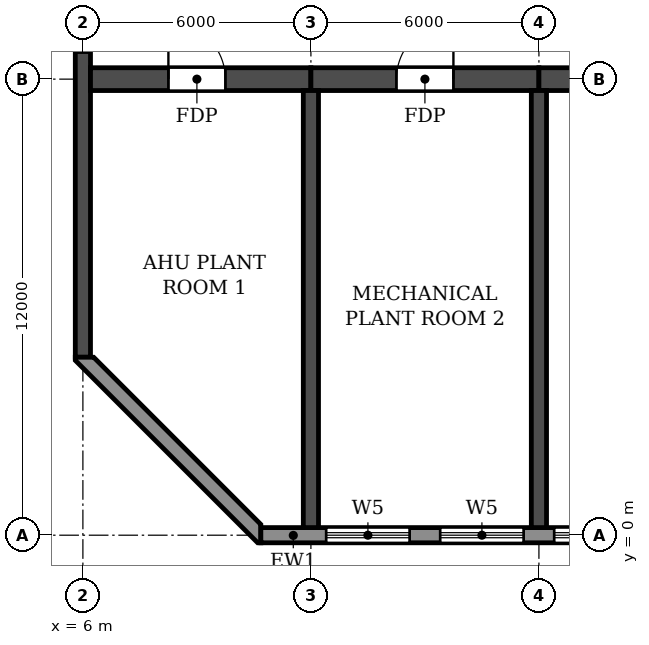
"""IFC4 building model, lengths in metres.
Left out: names, types, materials, properties, quantities, classifications, styles, units other than length and angle.
Written with IfcOpenShell. Run it as: python <this file> out.ifc"""

import sys

from ifc_helpers import new_model, si_unit, direction, frame, frame_2d, origin, place, context, subcontext, project, spatial, polyline, rectangle, outline, extrude, element, fill, save


model = new_model("IFC4")
c1 = context("Model", 3, precision=1e-05, world=origin(), true_north=direction((0.0, 1.0)))
c2 = subcontext(c1, "Body", "Model", "MODEL_VIEW")
j1 = project(units=[si_unit("LENGTHUNIT", "METRE"), si_unit("PLANEANGLEUNIT", "RADIAN")], contexts=[c1])
p1 = place(None, origin())
s1 = spatial("IfcSite", under=j1, at=p1, CompositionType="ELEMENT")
p2 = place(p1, origin())
s2 = spatial("IfcBuilding", under=s1, at=p2, CompositionType="ELEMENT")
p3 = place(p2, frame((0.0, 0.0, 66.3)))
s3 = spatial("IfcBuildingStorey", under=s2, at=p3, CompositionType="ELEMENT", Elevation=66.3)
for number, where, z_axis, x_axis in (
    (1, (12.0, 0.2, 0.0), (0.0, 0.0, 1.0), (0.0, 1.0, 0.0)),
    (2, (18.0, 0.2, 0.0), (0.0, 0.0, 1.0), (0.0, 1.0, 0.0)),
):
    element("IfcWall", number, at=place(p3, frame(where, z_axis=z_axis, x_axis=x_axis)), inside=s3, PredefinedType="SHEAR", context=c2, shape_type="SweptSolid", body=[
        extrude(rectangle(XDim=11.5, YDim=0.4, at=frame_2d((5.75, 0.0))), origin(), (0.0, 0.0, 1.0), 6.36),
    ])
p4 = place(p3, frame((6.0, 4.683, 0.0), z_axis=(0.0, 0.0, 1.0), x_axis=(0.0, 1.0, 0.0)))
e3 = element("IfcWall", 3, at=p4, inside=s3, PredefinedType="SHEAR", context=c2, shape_type="SweptSolid", body=[
    extrude(rectangle(XDim=35.434, YDim=0.4, at=frame_2d((17.717, 0.0))), origin(), (0.0, 0.0, 1.0), 6.36),
])
p5 = place(p4, frame((23.817, 0.0, 0.9)))
e4 = element("IfcOpeningElement", 4, at=p5, cuts=e3, PredefinedType="OPENING", context=c2, shape_type="SweptSolid", body=[
    extrude(rectangle(XDim=1.2, YDim=1.5, at=frame_2d((0.6, 0.75))), frame((0.0, 0.21, 0.0), z_axis=(0.0, -1.0, 0.0), x_axis=(1.0, 0.0, 0.0)), (0.0, 0.0, 1.0), 0.42),
])
p6 = place(p4, frame((8.017, 0.0, 0.9)))
e5 = element("IfcOpeningElement", 5, at=p6, cuts=e3, PredefinedType="OPENING", context=c2, shape_type="SweptSolid", body=[
    extrude(rectangle(XDim=1.2, YDim=1.5, at=frame_2d((0.6, 0.75))), frame((0.0, 0.21, 0.0), z_axis=(0.0, -1.0, 0.0), x_axis=(1.0, 0.0, 0.0)), (0.0, 0.0, 1.0), 0.42),
])
p7 = place(p4, frame((13.317, 0.0, 0.9)))
e6 = element("IfcOpeningElement", 6, at=p7, cuts=e3, PredefinedType="OPENING", context=c2, shape_type="SweptSolid", body=[
    extrude(rectangle(XDim=1.2, YDim=1.5, at=frame_2d((0.6, 0.75))), frame((0.0, 0.21, 0.0), z_axis=(0.0, -1.0, 0.0), x_axis=(1.0, 0.0, 0.0)), (0.0, 0.0, 1.0), 0.42),
])
p8 = place(p3, frame((6.2, 12.0, 0.0), z_axis=(0.0, 0.0, 1.0), x_axis=(1.0, 0.0, 0.0)))
e7 = element("IfcWall", 7, at=p8, inside=s3, PredefinedType="SHEAR", context=c2, shape_type="SweptSolid", body=[
    extrude(rectangle(XDim=5.8, YDim=0.6, at=frame_2d((2.9, 0.0))), origin(), (0.0, 0.0, 1.0), 6.36),
])
p9 = place(p8, frame((2.05, 0.0, 0.0)))
e8 = element("IfcOpeningElement", 8, at=p9, cuts=e7, PredefinedType="OPENING", context=c2, shape_type="SweptSolid", body=[
    extrude(rectangle(XDim=1.5, YDim=2.1, at=frame_2d((0.75, 1.05))), frame((0.0, 0.31, 0.0), z_axis=(0.0, -1.0, 0.0), x_axis=(1.0, 0.0, 0.0)), (0.0, 0.0, 1.0), 0.62),
])
p10 = place(p3, frame((12.0, 12.0, 0.0), z_axis=(0.0, 0.0, 1.0), x_axis=(1.0, 0.0, 0.0)))
e9 = element("IfcWall", 9, at=p10, inside=s3, PredefinedType="SHEAR", context=c2, shape_type="SweptSolid", body=[
    extrude(rectangle(XDim=6.0, YDim=0.6, at=frame_2d((3.0, 0.0))), origin(), (0.0, 0.0, 1.0), 6.36),
])
p11 = place(p10, frame((2.25, 0.0, 0.0)))
e10 = element("IfcOpeningElement", 10, at=p11, cuts=e9, PredefinedType="OPENING", context=c2, shape_type="SweptSolid", body=[
    extrude(rectangle(XDim=1.5, YDim=2.1, at=frame_2d((0.75, 1.05))), frame((0.0, 0.31, 0.0), z_axis=(0.0, -1.0, 0.0), x_axis=(1.0, 0.0, 0.0)), (0.0, 0.0, 1.0), 0.62),
])
p12 = place(p3, frame((18.0, 12.0, 0.0), z_axis=(0.0, 0.0, 1.0), x_axis=(1.0, 0.0, 0.0)))
e11 = element("IfcWall", 11, at=p12, inside=s3, PredefinedType="SHEAR", context=c2, shape_type="SweptSolid", body=[
    extrude(rectangle(XDim=6.0, YDim=0.6, at=frame_2d((3.0, 0.0))), origin(), (0.0, 0.0, 1.0), 6.36),
])
p13 = place(p12, frame((2.25, 0.0, 0.0)))
e12 = element("IfcOpeningElement", 12, at=p13, cuts=e11, PredefinedType="OPENING", context=c2, shape_type="SweptSolid", body=[
    extrude(rectangle(XDim=1.5, YDim=2.1, at=frame_2d((0.75, 1.05))), frame((0.0, 0.31, 0.0), z_axis=(0.0, -1.0, 0.0), x_axis=(1.0, 0.0, 0.0)), (0.0, 0.0, 1.0), 0.62),
])
p14 = place(p3, frame((10.683, 0.0, 0.0), z_axis=(0.0, 0.0, 1.0), x_axis=(1.0, 0.0, 0.0)))
e13 = element("IfcWall", 13, at=p14, inside=s3, PredefinedType="STANDARD", context=c2, shape_type="SweptSolid", body=[
    extrude(rectangle(XDim=80.634, YDim=0.4, at=frame_2d((40.317, 0.0))), origin(), (0.0, 0.0, 1.0), 6.36),
])
p15 = place(p14, frame((1.717, 0.0, 0.6)))
e14 = element("IfcOpeningElement", 14, at=p15, cuts=e13, PredefinedType="OPENING", context=c2, shape_type="SweptSolid", body=[
    extrude(rectangle(XDim=2.2, YDim=2.4, at=frame_2d((1.1, 1.2))), frame((0.0, 0.21, 0.0), z_axis=(0.0, -1.0, 0.0), x_axis=(1.0, 0.0, 0.0)), (0.0, 0.0, 1.0), 0.42),
])
p16 = place(p14, frame((4.717, 0.0, 0.6)))
e15 = element("IfcOpeningElement", 15, at=p16, cuts=e13, PredefinedType="OPENING", context=c2, shape_type="SweptSolid", body=[
    extrude(rectangle(XDim=2.2, YDim=2.4, at=frame_2d((1.1, 1.2))), frame((0.0, 0.21, 0.0), z_axis=(0.0, -1.0, 0.0), x_axis=(1.0, 0.0, 0.0)), (0.0, 0.0, 1.0), 0.42),
])
p17 = place(p14, frame((7.717, 0.0, 0.6)))
e16 = element("IfcOpeningElement", 16, at=p17, cuts=e13, PredefinedType="OPENING", context=c2, shape_type="SweptSolid", body=[
    extrude(rectangle(XDim=2.2, YDim=2.4, at=frame_2d((1.1, 1.2))), frame((0.0, 0.21, 0.0), z_axis=(0.0, -1.0, 0.0), x_axis=(1.0, 0.0, 0.0)), (0.0, 0.0, 1.0), 0.42),
])
p18 = place(p14, frame((10.717, 0.0, 0.6)))
e17 = element("IfcOpeningElement", 17, at=p18, cuts=e13, PredefinedType="OPENING", context=c2, shape_type="SweptSolid", body=[
    extrude(rectangle(XDim=2.2, YDim=2.4, at=frame_2d((1.1, 1.2))), frame((0.0, 0.21, 0.0), z_axis=(0.0, -1.0, 0.0), x_axis=(1.0, 0.0, 0.0)), (0.0, 0.0, 1.0), 0.42),
])
p19 = place(p14, frame((13.717, 0.0, 0.6)))
e18 = element("IfcOpeningElement", 18, at=p19, cuts=e13, PredefinedType="OPENING", context=c2, shape_type="SweptSolid", body=[
    extrude(rectangle(XDim=2.2, YDim=2.4, at=frame_2d((1.1, 1.2))), frame((0.0, 0.21, 0.0), z_axis=(0.0, -1.0, 0.0), x_axis=(1.0, 0.0, 0.0)), (0.0, 0.0, 1.0), 0.42),
])
p20 = place(p14, frame((16.717, 0.0, 0.6)))
e19 = element("IfcOpeningElement", 19, at=p20, cuts=e13, PredefinedType="OPENING", context=c2, shape_type="SweptSolid", body=[
    extrude(rectangle(XDim=2.2, YDim=2.4, at=frame_2d((1.1, 1.2))), frame((0.0, 0.21, 0.0), z_axis=(0.0, -1.0, 0.0), x_axis=(1.0, 0.0, 0.0)), (0.0, 0.0, 1.0), 0.42),
])
p21 = place(p14, frame((19.717, 0.0, 0.6)))
e20 = element("IfcOpeningElement", 20, at=p21, cuts=e13, PredefinedType="OPENING", context=c2, shape_type="SweptSolid", body=[
    extrude(rectangle(XDim=2.2, YDim=2.4, at=frame_2d((1.1, 1.2))), frame((0.0, 0.21, 0.0), z_axis=(0.0, -1.0, 0.0), x_axis=(1.0, 0.0, 0.0)), (0.0, 0.0, 1.0), 0.42),
])
p22 = place(p14, frame((22.717, 0.0, 0.6)))
e21 = element("IfcOpeningElement", 21, at=p22, cuts=e13, PredefinedType="OPENING", context=c2, shape_type="SweptSolid", body=[
    extrude(rectangle(XDim=2.2, YDim=2.4, at=frame_2d((1.1, 1.2))), frame((0.0, 0.21, 0.0), z_axis=(0.0, -1.0, 0.0), x_axis=(1.0, 0.0, 0.0)), (0.0, 0.0, 1.0), 0.42),
])
p23 = place(p14, frame((25.717, 0.0, 0.6)))
e22 = element("IfcOpeningElement", 22, at=p23, cuts=e13, PredefinedType="OPENING", context=c2, shape_type="SweptSolid", body=[
    extrude(rectangle(XDim=2.2, YDim=2.4, at=frame_2d((1.1, 1.2))), frame((0.0, 0.21, 0.0), z_axis=(0.0, -1.0, 0.0), x_axis=(1.0, 0.0, 0.0)), (0.0, 0.0, 1.0), 0.42),
])
p24 = place(p14, frame((28.717, 0.0, 0.6)))
e23 = element("IfcOpeningElement", 23, at=p24, cuts=e13, PredefinedType="OPENING", context=c2, shape_type="SweptSolid", body=[
    extrude(rectangle(XDim=2.2, YDim=2.4, at=frame_2d((1.1, 1.2))), frame((0.0, 0.21, 0.0), z_axis=(0.0, -1.0, 0.0), x_axis=(1.0, 0.0, 0.0)), (0.0, 0.0, 1.0), 0.42),
])
p25 = place(p14, frame((31.717, 0.0, 0.6)))
e24 = element("IfcOpeningElement", 24, at=p25, cuts=e13, PredefinedType="OPENING", context=c2, shape_type="SweptSolid", body=[
    extrude(rectangle(XDim=2.2, YDim=2.4, at=frame_2d((1.1, 1.2))), frame((0.0, 0.21, 0.0), z_axis=(0.0, -1.0, 0.0), x_axis=(1.0, 0.0, 0.0)), (0.0, 0.0, 1.0), 0.42),
])
p26 = place(p14, frame((34.717, 0.0, 0.6)))
e25 = element("IfcOpeningElement", 25, at=p26, cuts=e13, PredefinedType="OPENING", context=c2, shape_type="SweptSolid", body=[
    extrude(rectangle(XDim=2.2, YDim=2.4, at=frame_2d((1.1, 1.2))), frame((0.0, 0.21, 0.0), z_axis=(0.0, -1.0, 0.0), x_axis=(1.0, 0.0, 0.0)), (0.0, 0.0, 1.0), 0.42),
])
p27 = place(p14, frame((37.717, 0.0, 0.6)))
e26 = element("IfcOpeningElement", 26, at=p27, cuts=e13, PredefinedType="OPENING", context=c2, shape_type="SweptSolid", body=[
    extrude(rectangle(XDim=2.2, YDim=2.4, at=frame_2d((1.1, 1.2))), frame((0.0, 0.21, 0.0), z_axis=(0.0, -1.0, 0.0), x_axis=(1.0, 0.0, 0.0)), (0.0, 0.0, 1.0), 0.42),
])
p28 = place(p14, frame((40.717, 0.0, 0.6)))
e27 = element("IfcOpeningElement", 27, at=p28, cuts=e13, PredefinedType="OPENING", context=c2, shape_type="SweptSolid", body=[
    extrude(rectangle(XDim=2.2, YDim=2.4, at=frame_2d((1.1, 1.2))), frame((0.0, 0.21, 0.0), z_axis=(0.0, -1.0, 0.0), x_axis=(1.0, 0.0, 0.0)), (0.0, 0.0, 1.0), 0.42),
])
p29 = place(p14, frame((43.717, 0.0, 0.6)))
e28 = element("IfcOpeningElement", 28, at=p29, cuts=e13, PredefinedType="OPENING", context=c2, shape_type="SweptSolid", body=[
    extrude(rectangle(XDim=2.2, YDim=2.4, at=frame_2d((1.1, 1.2))), frame((0.0, 0.21, 0.0), z_axis=(0.0, -1.0, 0.0), x_axis=(1.0, 0.0, 0.0)), (0.0, 0.0, 1.0), 0.42),
])
p30 = place(p14, frame((46.717, 0.0, 0.6)))
e29 = element("IfcOpeningElement", 29, at=p30, cuts=e13, PredefinedType="OPENING", context=c2, shape_type="SweptSolid", body=[
    extrude(rectangle(XDim=2.2, YDim=2.4, at=frame_2d((1.1, 1.2))), frame((0.0, 0.21, 0.0), z_axis=(0.0, -1.0, 0.0), x_axis=(1.0, 0.0, 0.0)), (0.0, 0.0, 1.0), 0.42),
])
p31 = place(p14, frame((49.717, 0.0, 0.6)))
e30 = element("IfcOpeningElement", 30, at=p31, cuts=e13, PredefinedType="OPENING", context=c2, shape_type="SweptSolid", body=[
    extrude(rectangle(XDim=2.2, YDim=2.4, at=frame_2d((1.1, 1.2))), frame((0.0, 0.21, 0.0), z_axis=(0.0, -1.0, 0.0), x_axis=(1.0, 0.0, 0.0)), (0.0, 0.0, 1.0), 0.42),
])
p32 = place(p14, frame((52.717, 0.0, 0.6)))
e31 = element("IfcOpeningElement", 31, at=p32, cuts=e13, PredefinedType="OPENING", context=c2, shape_type="SweptSolid", body=[
    extrude(rectangle(XDim=2.2, YDim=2.4, at=frame_2d((1.1, 1.2))), frame((0.0, 0.21, 0.0), z_axis=(0.0, -1.0, 0.0), x_axis=(1.0, 0.0, 0.0)), (0.0, 0.0, 1.0), 0.42),
])
p33 = place(p14, frame((55.717, 0.0, 0.6)))
e32 = element("IfcOpeningElement", 32, at=p33, cuts=e13, PredefinedType="OPENING", context=c2, shape_type="SweptSolid", body=[
    extrude(rectangle(XDim=2.2, YDim=2.4, at=frame_2d((1.1, 1.2))), frame((0.0, 0.21, 0.0), z_axis=(0.0, -1.0, 0.0), x_axis=(1.0, 0.0, 0.0)), (0.0, 0.0, 1.0), 0.42),
])
p34 = place(p14, frame((58.717, 0.0, 0.6)))
e33 = element("IfcOpeningElement", 33, at=p34, cuts=e13, PredefinedType="OPENING", context=c2, shape_type="SweptSolid", body=[
    extrude(rectangle(XDim=2.2, YDim=2.4, at=frame_2d((1.1, 1.2))), frame((0.0, 0.21, 0.0), z_axis=(0.0, -1.0, 0.0), x_axis=(1.0, 0.0, 0.0)), (0.0, 0.0, 1.0), 0.42),
])
p35 = place(p14, frame((61.717, 0.0, 0.6)))
e34 = element("IfcOpeningElement", 34, at=p35, cuts=e13, PredefinedType="OPENING", context=c2, shape_type="SweptSolid", body=[
    extrude(rectangle(XDim=2.2, YDim=2.4, at=frame_2d((1.1, 1.2))), frame((0.0, 0.21, 0.0), z_axis=(0.0, -1.0, 0.0), x_axis=(1.0, 0.0, 0.0)), (0.0, 0.0, 1.0), 0.42),
])
p36 = place(p14, frame((64.717, 0.0, 0.6)))
e35 = element("IfcOpeningElement", 35, at=p36, cuts=e13, PredefinedType="OPENING", context=c2, shape_type="SweptSolid", body=[
    extrude(rectangle(XDim=2.2, YDim=2.4, at=frame_2d((1.1, 1.2))), frame((0.0, 0.21, 0.0), z_axis=(0.0, -1.0, 0.0), x_axis=(1.0, 0.0, 0.0)), (0.0, 0.0, 1.0), 0.42),
])
p37 = place(p14, frame((67.717, 0.0, 0.6)))
e36 = element("IfcOpeningElement", 36, at=p37, cuts=e13, PredefinedType="OPENING", context=c2, shape_type="SweptSolid", body=[
    extrude(rectangle(XDim=2.2, YDim=2.4, at=frame_2d((1.1, 1.2))), frame((0.0, 0.21, 0.0), z_axis=(0.0, -1.0, 0.0), x_axis=(1.0, 0.0, 0.0)), (0.0, 0.0, 1.0), 0.42),
])
p38 = place(p14, frame((70.717, 0.0, 0.6)))
e37 = element("IfcOpeningElement", 37, at=p38, cuts=e13, PredefinedType="OPENING", context=c2, shape_type="SweptSolid", body=[
    extrude(rectangle(XDim=2.2, YDim=2.4, at=frame_2d((1.1, 1.2))), frame((0.0, 0.21, 0.0), z_axis=(0.0, -1.0, 0.0), x_axis=(1.0, 0.0, 0.0)), (0.0, 0.0, 1.0), 0.42),
])
p39 = place(p14, frame((73.717, 0.0, 0.6)))
e38 = element("IfcOpeningElement", 38, at=p39, cuts=e13, PredefinedType="OPENING", context=c2, shape_type="SweptSolid", body=[
    extrude(rectangle(XDim=2.2, YDim=2.4, at=frame_2d((1.1, 1.2))), frame((0.0, 0.21, 0.0), z_axis=(0.0, -1.0, 0.0), x_axis=(1.0, 0.0, 0.0)), (0.0, 0.0, 1.0), 0.42),
])
p40 = place(p14, frame((76.717, 0.0, 0.6)))
e39 = element("IfcOpeningElement", 39, at=p40, cuts=e13, PredefinedType="OPENING", context=c2, shape_type="SweptSolid", body=[
    extrude(rectangle(XDim=2.2, YDim=2.4, at=frame_2d((1.1, 1.2))), frame((0.0, 0.21, 0.0), z_axis=(0.0, -1.0, 0.0), x_axis=(1.0, 0.0, 0.0)), (0.0, 0.0, 1.0), 0.42),
])
p41 = place(p3, origin())
e40 = element("IfcWall", 40, at=p41, inside=s3, PredefinedType="STANDARD", context=c2, shape_type="SweptSolid", body=[
    extrude(outline(polyline([(5.8, 4.683), (5.8, 4.6), (10.6, -0.2), (10.683, -0.2), (10.683, 0.283), (6.283, 4.683), (5.8, 4.683)])), origin(), (0.0, 0.0, 1.0), 6.36),
])
p42 = place(p15, origin())
e41 = element("IfcWindow", 41, at=p42, inside=s3, PartitioningType="TRIPLE_PANEL_HORIZONTAL", PredefinedType="WINDOW", context=c2, shape_type="SweptSolid", body=[
    extrude(rectangle(XDim=2.2, YDim=2.4, at=frame_2d((1.1, 1.2))), frame((0.0, 0.03, 0.0), z_axis=(0.0, -1.0, 0.0), x_axis=(1.0, 0.0, 0.0)), (0.0, 0.0, 1.0), 0.06),
])
fill(e14, e41)
p43 = place(p16, origin())
e42 = element("IfcWindow", 42, at=p43, inside=s3, PartitioningType="TRIPLE_PANEL_HORIZONTAL", PredefinedType="WINDOW", context=c2, shape_type="SweptSolid", body=[
    extrude(rectangle(XDim=2.2, YDim=2.4, at=frame_2d((1.1, 1.2))), frame((0.0, 0.03, 0.0), z_axis=(0.0, -1.0, 0.0), x_axis=(1.0, 0.0, 0.0)), (0.0, 0.0, 1.0), 0.06),
])
fill(e15, e42)
p44 = place(p17, origin())
e43 = element("IfcWindow", 43, at=p44, inside=s3, PartitioningType="TRIPLE_PANEL_HORIZONTAL", PredefinedType="WINDOW", context=c2, shape_type="SweptSolid", body=[
    extrude(rectangle(XDim=2.2, YDim=2.4, at=frame_2d((1.1, 1.2))), frame((0.0, 0.03, 0.0), z_axis=(0.0, -1.0, 0.0), x_axis=(1.0, 0.0, 0.0)), (0.0, 0.0, 1.0), 0.06),
])
fill(e16, e43)
p45 = place(p9, origin())
e44 = element("IfcDoor", 44, at=p45, inside=s3, OperationType="DOUBLE_DOOR_SINGLE_SWING", PredefinedType="DOOR", context=c2, shape_type="SweptSolid", body=[
    extrude(rectangle(XDim=1.5, YDim=2.1, at=frame_2d((0.75, 1.05))), frame((0.0, 0.025, 0.0), z_axis=(0.0, -1.0, 0.0), x_axis=(1.0, 0.0, 0.0)), (0.0, 0.0, 1.0), 0.05),
])
fill(e8, e44)
p46 = place(p11, origin())
e45 = element("IfcDoor", 45, at=p46, inside=s3, OperationType="DOUBLE_DOOR_SINGLE_SWING", PredefinedType="DOOR", context=c2, shape_type="SweptSolid", body=[
    extrude(rectangle(XDim=1.5, YDim=2.1, at=frame_2d((0.75, 1.05))), frame((0.0, 0.025, 0.0), z_axis=(0.0, -1.0, 0.0), x_axis=(1.0, 0.0, 0.0)), (0.0, 0.0, 1.0), 0.05),
])
fill(e10, e45)
save(model, sys.argv[1])
